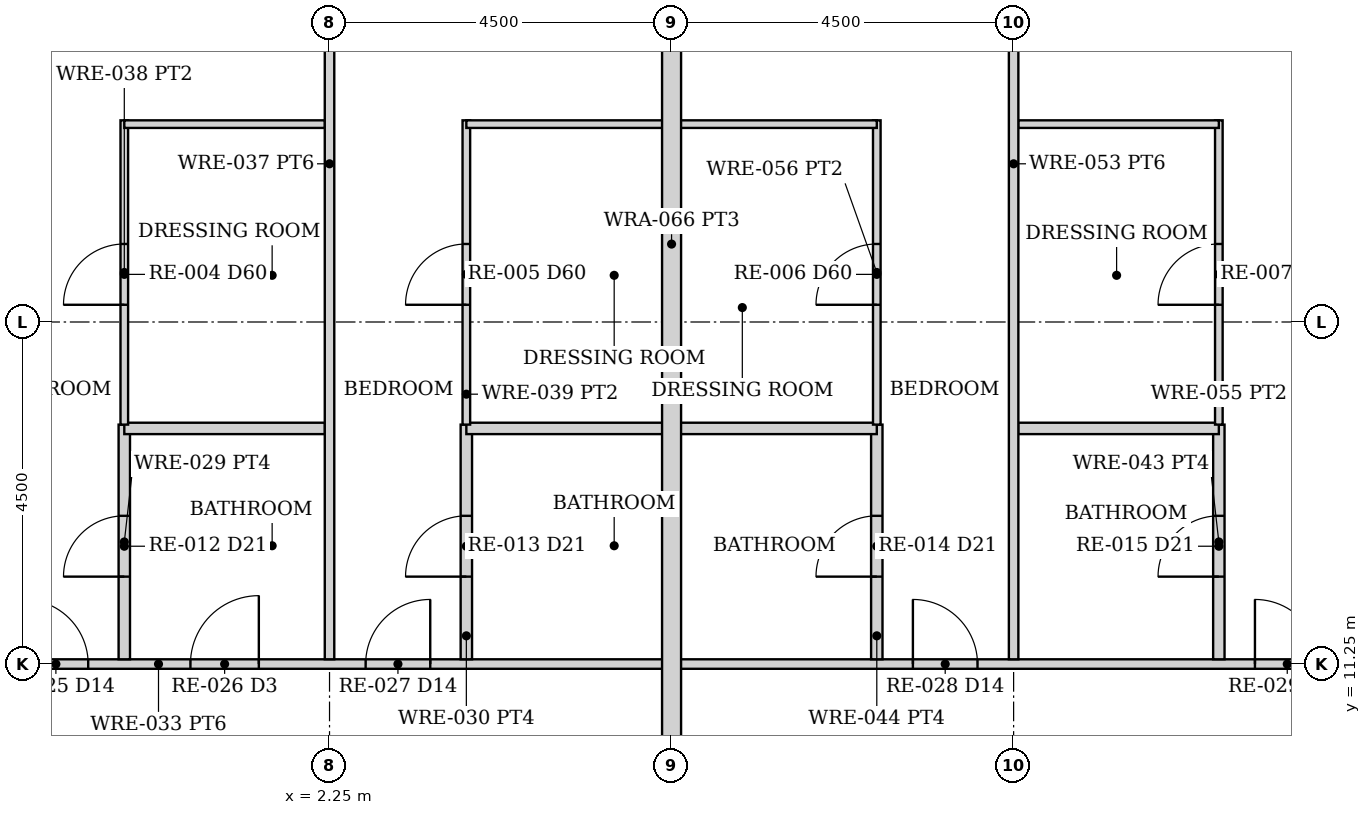
"""IFC4 building model, lengths in metres.
Left out: names, types, materials, properties, quantities, classifications, styles, units other than length and angle.
Written with IfcOpenShell. Run it as: python <this file> out.ifc"""

import sys

from ifc_helpers import new_model, si_unit, direction, frame, frame_2d, origin, place, context, subcontext, project, spatial, rectangle, extrude, element, fill, save


model = new_model("IFC4")
c1 = context("Model", 3, precision=1e-05, world=origin(), true_north=direction((0.0, 1.0)))
c2 = subcontext(c1, "Body", "Model", "MODEL_VIEW")
j1 = project(units=[si_unit("LENGTHUNIT", "METRE"), si_unit("PLANEANGLEUNIT", "RADIAN")], contexts=[c1])
p1 = place(None, origin())
s1 = spatial("IfcSite", under=j1, at=p1, CompositionType="ELEMENT")
p2 = place(p1, origin())
s2 = spatial("IfcBuilding", under=s1, at=p2, CompositionType="ELEMENT")
p3 = place(p2, frame((0.0, 0.0, 68.5)))
s3 = spatial("IfcBuildingStorey", under=s2, at=p3, CompositionType="ELEMENT", Elevation=68.5)
p4 = place(p3, frame((-6.65, 11.25, 0.0), z_axis=(0.0, 0.0, 1.0), x_axis=(1.0, 0.0, 0.0)))
e1 = element("IfcWall", 1, at=p4, inside=s3, PredefinedType="PARTITIONING", context=c2, shape_type="SweptSolid", body=[
    extrude(rectangle(XDim=13.3, YDim=0.125, at=frame_2d((6.65, 0.0))), origin(), (0.0, 0.0, 1.0), 2.373),
])
p5 = place(p4, frame((0.7, 0.0, 0.0)))
e2 = element("IfcOpeningElement", 2, at=p5, cuts=e1, PredefinedType="OPENING", context=c2, shape_type="SweptSolid", body=[
    extrude(rectangle(XDim=0.9, YDim=2.1, at=frame_2d((0.45, 1.05))), frame((0.0, 0.073, 0.0), z_axis=(0.0, -1.0, 0.0), x_axis=(1.0, 0.0, 0.0)), (0.0, 0.0, 1.0), 0.145),
])
p6 = place(p4, frame((2.7, 0.0, 0.0)))
e3 = element("IfcOpeningElement", 3, at=p6, cuts=e1, PredefinedType="OPENING", context=c2, shape_type="SweptSolid", body=[
    extrude(rectangle(XDim=1.4, YDim=2.1, at=frame_2d((0.7, 1.05))), frame((0.0, 0.073, 0.0), z_axis=(0.0, -1.0, 0.0), x_axis=(1.0, 0.0, 0.0)), (0.0, 0.0, 1.0), 0.145),
])
p7 = place(p4, frame((4.875, 0.0, 0.0)))
e4 = element("IfcOpeningElement", 4, at=p7, cuts=e1, PredefinedType="OPENING", context=c2, shape_type="SweptSolid", body=[
    extrude(rectangle(XDim=0.85, YDim=2.1, at=frame_2d((0.425, 1.05))), frame((0.0, 0.073, 0.0), z_axis=(0.0, -1.0, 0.0), x_axis=(1.0, 0.0, 0.0)), (0.0, 0.0, 1.0), 0.145),
])
p8 = place(p4, frame((7.07, 0.0, 0.0)))
e5 = element("IfcOpeningElement", 5, at=p8, cuts=e1, PredefinedType="OPENING", context=c2, shape_type="SweptSolid", body=[
    extrude(rectangle(XDim=0.9, YDim=2.1, at=frame_2d((0.45, 1.05))), frame((0.0, 0.073, 0.0), z_axis=(0.0, -1.0, 0.0), x_axis=(1.0, 0.0, 0.0)), (0.0, 0.0, 1.0), 0.145),
])
p9 = place(p4, frame((9.375, 0.0, 0.0)))
e6 = element("IfcOpeningElement", 6, at=p9, cuts=e1, PredefinedType="OPENING", context=c2, shape_type="SweptSolid", body=[
    extrude(rectangle(XDim=0.85, YDim=2.1, at=frame_2d((0.425, 1.05))), frame((0.0, 0.073, 0.0), z_axis=(0.0, -1.0, 0.0), x_axis=(1.0, 0.0, 0.0)), (0.0, 0.0, 1.0), 0.145),
])
p10 = place(p3, frame((-0.45, 11.312, 0.0), z_axis=(0.0, 0.0, 1.0), x_axis=(0.0, 1.0, 0.0)))
e7 = element("IfcWall", 7, at=p10, inside=s3, PredefinedType="PARTITIONING", context=c2, shape_type="SweptSolid", body=[
    extrude(rectangle(XDim=3.087, YDim=0.15, at=frame_2d((1.544, 0.0))), origin(), (0.0, 0.0, 1.0), 2.373),
])
p11 = place(p10, frame((1.087, 0.0, 0.0)))
e8 = element("IfcOpeningElement", 8, at=p11, cuts=e7, PredefinedType="OPENING", context=c2, shape_type="SweptSolid", body=[
    extrude(rectangle(XDim=0.8, YDim=2.1, at=frame_2d((0.4, 1.05))), frame((0.0, 0.085, 0.0), z_axis=(0.0, -1.0, 0.0), x_axis=(1.0, 0.0, 0.0)), (0.0, 0.0, 1.0), 0.17),
])
p12 = place(p3, frame((-0.45, 14.35, 0.0), z_axis=(0.0, 0.0, 1.0), x_axis=(1.0, 0.0, 0.0)))
e9 = element("IfcWall", 9, at=p12, inside=s3, PredefinedType="PARTITIONING", context=c2, shape_type="SweptSolid", body=[
    extrude(rectangle(XDim=2.64, YDim=0.15, at=frame_2d((1.32, 0.0))), origin(), (0.0, 0.0, 1.0), 2.373),
])
p13 = place(p3, frame((-0.45, 14.4, 0.0), z_axis=(0.0, 0.0, 1.0), x_axis=(0.0, 1.0, 0.0)))
e10 = element("IfcWall", 10, at=p13, inside=s3, PredefinedType="PARTITIONING", context=c2, shape_type="SweptSolid", body=[
    extrude(rectangle(XDim=4.003, YDim=0.1, at=frame_2d((2.001, 0.0))), origin(), (0.0, 0.0, 1.0), 2.373),
])
p14 = place(p13, frame((1.576, 0.0, 0.0)))
e11 = element("IfcOpeningElement", 11, at=p14, cuts=e10, PredefinedType="OPENING", context=c2, shape_type="SweptSolid", body=[
    extrude(rectangle(XDim=0.8, YDim=2.1, at=frame_2d((0.4, 1.05))), frame((0.0, 0.06, 0.0), z_axis=(0.0, -1.0, 0.0), x_axis=(1.0, 0.0, 0.0)), (0.0, 0.0, 1.0), 0.12),
])
p15 = place(p3, frame((-0.45, 18.353, 0.0), z_axis=(0.0, 0.0, 1.0), x_axis=(1.0, 0.0, 0.0)))
e12 = element("IfcWall", 12, at=p15, inside=s3, PredefinedType="PARTITIONING", context=c2, shape_type="SweptSolid", body=[
    extrude(rectangle(XDim=2.64, YDim=0.1, at=frame_2d((1.32, 0.0))), origin(), (0.0, 0.0, 1.0), 2.373),
])
p16 = place(p3, frame((2.25, 11.312, 0.0), z_axis=(0.0, 0.0, 1.0), x_axis=(0.0, 1.0, 0.0)))
e13 = element("IfcWall", 13, at=p16, inside=s3, PredefinedType="PARTITIONING", context=c2, shape_type="SweptSolid", body=[
    extrude(rectangle(XDim=13.038, YDim=0.125, at=frame_2d((6.519, 0.0))), origin(), (0.0, 0.0, 1.0), 2.373),
])
p17 = place(p3, frame((4.05, 11.312, 0.0), z_axis=(0.0, 0.0, 1.0), x_axis=(0.0, 1.0, 0.0)))
e14 = element("IfcWall", 14, at=p17, inside=s3, PredefinedType="PARTITIONING", context=c2, shape_type="SweptSolid", body=[
    extrude(rectangle(XDim=3.087, YDim=0.15, at=frame_2d((1.544, 0.0))), origin(), (0.0, 0.0, 1.0), 2.373),
])
p18 = place(p17, frame((1.087, 0.0, 0.0)))
e15 = element("IfcOpeningElement", 15, at=p18, cuts=e14, PredefinedType="OPENING", context=c2, shape_type="SweptSolid", body=[
    extrude(rectangle(XDim=0.8, YDim=2.1, at=frame_2d((0.4, 1.05))), frame((0.0, 0.085, 0.0), z_axis=(0.0, -1.0, 0.0), x_axis=(1.0, 0.0, 0.0)), (0.0, 0.0, 1.0), 0.17),
])
p19 = place(p3, frame((4.05, 14.35, 0.0), z_axis=(0.0, 0.0, 1.0), x_axis=(1.0, 0.0, 0.0)))
e16 = element("IfcWall", 16, at=p19, inside=s3, PredefinedType="PARTITIONING", context=c2, shape_type="SweptSolid", body=[
    extrude(rectangle(XDim=2.64, YDim=0.15, at=frame_2d((1.32, 0.0))), origin(), (0.0, 0.0, 1.0), 2.373),
])
p20 = place(p3, frame((4.05, 14.4, 0.0), z_axis=(0.0, 0.0, 1.0), x_axis=(0.0, 1.0, 0.0)))
e17 = element("IfcWall", 17, at=p20, inside=s3, PredefinedType="PARTITIONING", context=c2, shape_type="SweptSolid", body=[
    extrude(rectangle(XDim=4.003, YDim=0.1, at=frame_2d((2.001, 0.0))), origin(), (0.0, 0.0, 1.0), 2.373),
])
p21 = place(p20, frame((1.576, 0.0, 0.0)))
e18 = element("IfcOpeningElement", 18, at=p21, cuts=e17, PredefinedType="OPENING", context=c2, shape_type="SweptSolid", body=[
    extrude(rectangle(XDim=0.8, YDim=2.1, at=frame_2d((0.4, 1.05))), frame((0.0, 0.06, 0.0), z_axis=(0.0, -1.0, 0.0), x_axis=(1.0, 0.0, 0.0)), (0.0, 0.0, 1.0), 0.12),
])
p22 = place(p3, frame((4.05, 18.353, 0.0), z_axis=(0.0, 0.0, 1.0), x_axis=(1.0, 0.0, 0.0)))
e19 = element("IfcWall", 19, at=p22, inside=s3, PredefinedType="PARTITIONING", context=c2, shape_type="SweptSolid", body=[
    extrude(rectangle(XDim=2.64, YDim=0.1, at=frame_2d((1.32, 0.0))), origin(), (0.0, 0.0, 1.0), 2.373),
])
p23 = place(p3, frame((6.85, 11.25, 0.0), z_axis=(0.0, 0.0, 1.0), x_axis=(1.0, 0.0, 0.0)))
e20 = element("IfcWall", 20, at=p23, inside=s3, PredefinedType="PARTITIONING", context=c2, shape_type="SweptSolid", body=[
    extrude(rectangle(XDim=17.5, YDim=0.125, at=frame_2d((8.75, 0.0))), origin(), (0.0, 0.0, 1.0), 2.373),
])
p24 = place(p23, frame((13.975, 0.0, 0.0)))
e21 = element("IfcOpeningElement", 21, at=p24, cuts=e20, PredefinedType="OPENING", context=c2, shape_type="SweptSolid", body=[
    extrude(rectangle(XDim=0.9, YDim=2.1, at=frame_2d((0.45, 1.05))), frame((0.0, 0.073, 0.0), z_axis=(0.0, -1.0, 0.0), x_axis=(1.0, 0.0, 0.0)), (0.0, 0.0, 1.0), 0.145),
])
p25 = place(p23, frame((15.75, 0.0, 0.0)))
e22 = element("IfcOpeningElement", 22, at=p25, cuts=e20, PredefinedType="OPENING", context=c2, shape_type="SweptSolid", body=[
    extrude(rectangle(XDim=1.4, YDim=2.1, at=frame_2d((0.7, 1.05))), frame((0.0, 0.073, 0.0), z_axis=(0.0, -1.0, 0.0), x_axis=(1.0, 0.0, 0.0)), (0.0, 0.0, 1.0), 0.145),
])
p26 = place(p23, frame((12.075, 0.0, 0.0)))
e23 = element("IfcOpeningElement", 23, at=p26, cuts=e20, PredefinedType="OPENING", context=c2, shape_type="SweptSolid", body=[
    extrude(rectangle(XDim=0.85, YDim=2.1, at=frame_2d((0.425, 1.05))), frame((0.0, 0.073, 0.0), z_axis=(0.0, -1.0, 0.0), x_axis=(1.0, 0.0, 0.0)), (0.0, 0.0, 1.0), 0.145),
])
p27 = place(p23, frame((9.83, 0.0, 0.0)))
e24 = element("IfcOpeningElement", 24, at=p27, cuts=e20, PredefinedType="OPENING", context=c2, shape_type="SweptSolid", body=[
    extrude(rectangle(XDim=0.9, YDim=2.1, at=frame_2d((0.45, 1.05))), frame((0.0, 0.073, 0.0), z_axis=(0.0, -1.0, 0.0), x_axis=(1.0, 0.0, 0.0)), (0.0, 0.0, 1.0), 0.145),
])
p28 = place(p23, frame((7.575, 0.0, 0.0)))
e25 = element("IfcOpeningElement", 25, at=p28, cuts=e20, PredefinedType="OPENING", context=c2, shape_type="SweptSolid", body=[
    extrude(rectangle(XDim=0.85, YDim=2.1, at=frame_2d((0.425, 1.05))), frame((0.0, 0.073, 0.0), z_axis=(0.0, -1.0, 0.0), x_axis=(1.0, 0.0, 0.0)), (0.0, 0.0, 1.0), 0.145),
])
p29 = place(p23, frame((3.075, 0.0, 0.0)))
e26 = element("IfcOpeningElement", 26, at=p29, cuts=e20, PredefinedType="OPENING", context=c2, shape_type="SweptSolid", body=[
    extrude(rectangle(XDim=0.85, YDim=2.1, at=frame_2d((0.425, 1.05))), frame((0.0, 0.073, 0.0), z_axis=(0.0, -1.0, 0.0), x_axis=(1.0, 0.0, 0.0)), (0.0, 0.0, 1.0), 0.145),
])
p30 = place(p3, frame((13.95, 11.312, 0.0), z_axis=(0.0, 0.0, 1.0), x_axis=(0.0, 1.0, 0.0)))
e27 = element("IfcWall", 27, at=p30, inside=s3, PredefinedType="PARTITIONING", context=c2, shape_type="SweptSolid", body=[
    extrude(rectangle(XDim=3.087, YDim=0.15, at=frame_2d((1.544, 0.0))), origin(), (0.0, 0.0, 1.0), 2.373),
])
p31 = place(p30, frame((1.087, 0.0, 0.0)))
e28 = element("IfcOpeningElement", 28, at=p31, cuts=e27, PredefinedType="OPENING", context=c2, shape_type="SweptSolid", body=[
    extrude(rectangle(XDim=0.8, YDim=2.1, at=frame_2d((0.4, 1.05))), frame((0.0, 0.085, 0.0), z_axis=(0.0, -1.0, 0.0), x_axis=(1.0, 0.0, 0.0)), (0.0, 0.0, 1.0), 0.17),
])
p32 = place(p3, frame((11.31, 14.35, 0.0), z_axis=(0.0, 0.0, 1.0), x_axis=(1.0, 0.0, 0.0)))
e29 = element("IfcWall", 29, at=p32, inside=s3, PredefinedType="PARTITIONING", context=c2, shape_type="SweptSolid", body=[
    extrude(rectangle(XDim=2.64, YDim=0.15, at=frame_2d((1.32, 0.0))), origin(), (0.0, 0.0, 1.0), 2.373),
])
p33 = place(p3, frame((13.95, 14.4, 0.0), z_axis=(0.0, 0.0, 1.0), x_axis=(0.0, 1.0, 0.0)))
e30 = element("IfcWall", 30, at=p33, inside=s3, PredefinedType="PARTITIONING", context=c2, shape_type="SweptSolid", body=[
    extrude(rectangle(XDim=4.003, YDim=0.1, at=frame_2d((2.001, 0.0))), origin(), (0.0, 0.0, 1.0), 2.373),
])
p34 = place(p33, frame((1.576, 0.0, 0.0)))
e31 = element("IfcOpeningElement", 31, at=p34, cuts=e30, PredefinedType="OPENING", context=c2, shape_type="SweptSolid", body=[
    extrude(rectangle(XDim=0.8, YDim=2.1, at=frame_2d((0.4, 1.05))), frame((0.0, 0.06, 0.0), z_axis=(0.0, -1.0, 0.0), x_axis=(1.0, 0.0, 0.0)), (0.0, 0.0, 1.0), 0.12),
])
p35 = place(p3, frame((11.31, 18.353, 0.0), z_axis=(0.0, 0.0, 1.0), x_axis=(1.0, 0.0, 0.0)))
e32 = element("IfcWall", 32, at=p35, inside=s3, PredefinedType="PARTITIONING", context=c2, shape_type="SweptSolid", body=[
    extrude(rectangle(XDim=2.64, YDim=0.1, at=frame_2d((1.32, 0.0))), origin(), (0.0, 0.0, 1.0), 2.373),
])
p36 = place(p3, frame((11.25, 11.312, 0.0), z_axis=(0.0, 0.0, 1.0), x_axis=(0.0, 1.0, 0.0)))
e33 = element("IfcWall", 33, at=p36, inside=s3, PredefinedType="PARTITIONING", context=c2, shape_type="SweptSolid", body=[
    extrude(rectangle(XDim=13.038, YDim=0.125, at=frame_2d((6.519, 0.0))), origin(), (0.0, 0.0, 1.0), 2.373),
])
p37 = place(p3, frame((9.45, 11.312, 0.0), z_axis=(0.0, 0.0, 1.0), x_axis=(0.0, 1.0, 0.0)))
e34 = element("IfcWall", 34, at=p37, inside=s3, PredefinedType="PARTITIONING", context=c2, shape_type="SweptSolid", body=[
    extrude(rectangle(XDim=3.087, YDim=0.15, at=frame_2d((1.544, 0.0))), origin(), (0.0, 0.0, 1.0), 2.373),
])
p38 = place(p37, frame((1.087, 0.0, 0.0)))
e35 = element("IfcOpeningElement", 35, at=p38, cuts=e34, PredefinedType="OPENING", context=c2, shape_type="SweptSolid", body=[
    extrude(rectangle(XDim=0.8, YDim=2.1, at=frame_2d((0.4, 1.05))), frame((0.0, 0.085, 0.0), z_axis=(0.0, -1.0, 0.0), x_axis=(1.0, 0.0, 0.0)), (0.0, 0.0, 1.0), 0.17),
])
p39 = place(p3, frame((6.81, 14.35, 0.0), z_axis=(0.0, 0.0, 1.0), x_axis=(1.0, 0.0, 0.0)))
e36 = element("IfcWall", 36, at=p39, inside=s3, PredefinedType="PARTITIONING", context=c2, shape_type="SweptSolid", body=[
    extrude(rectangle(XDim=2.64, YDim=0.15, at=frame_2d((1.32, 0.0))), origin(), (0.0, 0.0, 1.0), 2.373),
])
p40 = place(p3, frame((9.45, 14.4, 0.0), z_axis=(0.0, 0.0, 1.0), x_axis=(0.0, 1.0, 0.0)))
e37 = element("IfcWall", 37, at=p40, inside=s3, PredefinedType="PARTITIONING", context=c2, shape_type="SweptSolid", body=[
    extrude(rectangle(XDim=4.003, YDim=0.1, at=frame_2d((2.001, 0.0))), origin(), (0.0, 0.0, 1.0), 2.373),
])
p41 = place(p40, frame((1.576, 0.0, 0.0)))
e38 = element("IfcOpeningElement", 38, at=p41, cuts=e37, PredefinedType="OPENING", context=c2, shape_type="SweptSolid", body=[
    extrude(rectangle(XDim=0.8, YDim=2.1, at=frame_2d((0.4, 1.05))), frame((0.0, 0.06, 0.0), z_axis=(0.0, -1.0, 0.0), x_axis=(1.0, 0.0, 0.0)), (0.0, 0.0, 1.0), 0.12),
])
p42 = place(p3, frame((6.81, 18.353, 0.0), z_axis=(0.0, 0.0, 1.0), x_axis=(1.0, 0.0, 0.0)))
e39 = element("IfcWall", 39, at=p42, inside=s3, PredefinedType="PARTITIONING", context=c2, shape_type="SweptSolid", body=[
    extrude(rectangle(XDim=2.64, YDim=0.1, at=frame_2d((1.32, 0.0))), origin(), (0.0, 0.0, 1.0), 2.373),
])
p43 = place(p3, frame((6.75, 9.2, 0.0), z_axis=(0.0, 0.0, 1.0), x_axis=(0.0, 1.0, 0.0)))
e40 = element("IfcWall", 40, at=p43, inside=s3, PredefinedType="PARTITIONING", context=c2, shape_type="SweptSolid", body=[
    extrude(rectangle(XDim=15.15, YDim=0.25, at=frame_2d((7.575, 0.0))), origin(), (0.0, 0.0, 1.0), 2.373),
])
p44 = place(p7, origin())
e41 = element("IfcDoor", 41, at=p44, inside=s3, OperationType="SINGLE_SWING_LEFT", PredefinedType="DOOR", context=c2, shape_type="SweptSolid", body=[
    extrude(rectangle(XDim=0.85, YDim=2.1, at=frame_2d((0.425, 1.05))), frame((0.0, 0.025, 0.0), z_axis=(0.0, -1.0, 0.0), x_axis=(1.0, 0.0, 0.0)), (0.0, 0.0, 1.0), 0.05),
])
fill(e4, e41)
p45 = place(p11, origin())
e42 = element("IfcDoor", 42, at=p45, inside=s3, OperationType="SINGLE_SWING_LEFT", PredefinedType="DOOR", context=c2, shape_type="SweptSolid", body=[
    extrude(rectangle(XDim=0.8, YDim=2.1, at=frame_2d((0.4, 1.05))), frame((0.0, 0.025, 0.0), z_axis=(0.0, -1.0, 0.0), x_axis=(1.0, 0.0, 0.0)), (0.0, 0.0, 1.0), 0.05),
])
fill(e8, e42)
p46 = place(p8, origin())
e43 = element("IfcDoor", 43, at=p46, inside=s3, OperationType="SINGLE_SWING_RIGHT", PredefinedType="DOOR", context=c2, shape_type="SweptSolid", body=[
    extrude(rectangle(XDim=0.9, YDim=2.1, at=frame_2d((0.45, 1.05))), frame((0.0, 0.025, 0.0), z_axis=(0.0, -1.0, 0.0), x_axis=(1.0, 0.0, 0.0)), (0.0, 0.0, 1.0), 0.05),
])
fill(e5, e43)
p47 = place(p14, origin())
e44 = element("IfcDoor", 44, at=p47, inside=s3, OperationType="SINGLE_SWING_LEFT", PredefinedType="DOOR", context=c2, shape_type="SweptSolid", body=[
    extrude(rectangle(XDim=0.8, YDim=2.1, at=frame_2d((0.4, 1.05))), frame((0.0, 0.025, 0.0), z_axis=(0.0, -1.0, 0.0), x_axis=(1.0, 0.0, 0.0)), (0.0, 0.0, 1.0), 0.05),
])
fill(e11, e44)
p48 = place(p9, origin())
e45 = element("IfcDoor", 45, at=p48, inside=s3, OperationType="SINGLE_SWING_RIGHT", PredefinedType="DOOR", context=c2, shape_type="SweptSolid", body=[
    extrude(rectangle(XDim=0.85, YDim=2.1, at=frame_2d((0.425, 1.05))), frame((0.0, 0.025, 0.0), z_axis=(0.0, -1.0, 0.0), x_axis=(1.0, 0.0, 0.0)), (0.0, 0.0, 1.0), 0.05),
])
fill(e6, e45)
p49 = place(p18, origin())
e46 = element("IfcDoor", 46, at=p49, inside=s3, OperationType="SINGLE_SWING_LEFT", PredefinedType="DOOR", context=c2, shape_type="SweptSolid", body=[
    extrude(rectangle(XDim=0.8, YDim=2.1, at=frame_2d((0.4, 1.05))), frame((0.0, 0.025, 0.0), z_axis=(0.0, -1.0, 0.0), x_axis=(1.0, 0.0, 0.0)), (0.0, 0.0, 1.0), 0.05),
])
fill(e15, e46)
p50 = place(p21, origin())
e47 = element("IfcDoor", 47, at=p50, inside=s3, OperationType="SINGLE_SWING_LEFT", PredefinedType="DOOR", context=c2, shape_type="SweptSolid", body=[
    extrude(rectangle(XDim=0.8, YDim=2.1, at=frame_2d((0.4, 1.05))), frame((0.0, 0.025, 0.0), z_axis=(0.0, -1.0, 0.0), x_axis=(1.0, 0.0, 0.0)), (0.0, 0.0, 1.0), 0.05),
])
fill(e18, e47)
p51 = place(p28, origin())
e48 = element("IfcDoor", 48, at=p51, inside=s3, OperationType="SINGLE_SWING_LEFT", PredefinedType="DOOR", context=c2, shape_type="SweptSolid", body=[
    extrude(rectangle(XDim=0.85, YDim=2.1, at=frame_2d((0.425, 1.05))), frame((0.0, 0.025, 0.0), z_axis=(0.0, -1.0, 0.0), x_axis=(1.0, 0.0, 0.0)), (0.0, 0.0, 1.0), 0.05),
])
fill(e25, e48)
p52 = place(p31, origin())
e49 = element("IfcDoor", 49, at=p52, inside=s3, OperationType="SINGLE_SWING_LEFT", PredefinedType="DOOR", context=c2, shape_type="SweptSolid", body=[
    extrude(rectangle(XDim=0.8, YDim=2.1, at=frame_2d((0.4, 1.05))), frame((0.0, 0.025, 0.0), z_axis=(0.0, -1.0, 0.0), x_axis=(1.0, 0.0, 0.0)), (0.0, 0.0, 1.0), 0.05),
])
fill(e28, e49)
p53 = place(p34, origin())
e50 = element("IfcDoor", 50, at=p53, inside=s3, OperationType="SINGLE_SWING_LEFT", PredefinedType="DOOR", context=c2, shape_type="SweptSolid", body=[
    extrude(rectangle(XDim=0.8, YDim=2.1, at=frame_2d((0.4, 1.05))), frame((0.0, 0.025, 0.0), z_axis=(0.0, -1.0, 0.0), x_axis=(1.0, 0.0, 0.0)), (0.0, 0.0, 1.0), 0.05),
])
fill(e31, e50)
p54 = place(p29, origin())
e51 = element("IfcDoor", 51, at=p54, inside=s3, OperationType="SINGLE_SWING_LEFT", PredefinedType="DOOR", context=c2, shape_type="SweptSolid", body=[
    extrude(rectangle(XDim=0.85, YDim=2.1, at=frame_2d((0.425, 1.05))), frame((0.0, 0.025, 0.0), z_axis=(0.0, -1.0, 0.0), x_axis=(1.0, 0.0, 0.0)), (0.0, 0.0, 1.0), 0.05),
])
fill(e26, e51)
p55 = place(p38, origin())
e52 = element("IfcDoor", 52, at=p55, inside=s3, OperationType="SINGLE_SWING_LEFT", PredefinedType="DOOR", context=c2, shape_type="SweptSolid", body=[
    extrude(rectangle(XDim=0.8, YDim=2.1, at=frame_2d((0.4, 1.05))), frame((0.0, 0.025, 0.0), z_axis=(0.0, -1.0, 0.0), x_axis=(1.0, 0.0, 0.0)), (0.0, 0.0, 1.0), 0.05),
])
fill(e35, e52)
p56 = place(p41, origin())
e53 = element("IfcDoor", 53, at=p56, inside=s3, OperationType="SINGLE_SWING_LEFT", PredefinedType="DOOR", context=c2, shape_type="SweptSolid", body=[
    extrude(rectangle(XDim=0.8, YDim=2.1, at=frame_2d((0.4, 1.05))), frame((0.0, 0.025, 0.0), z_axis=(0.0, -1.0, 0.0), x_axis=(1.0, 0.0, 0.0)), (0.0, 0.0, 1.0), 0.05),
])
fill(e38, e53)
save(model, sys.argv[1])
